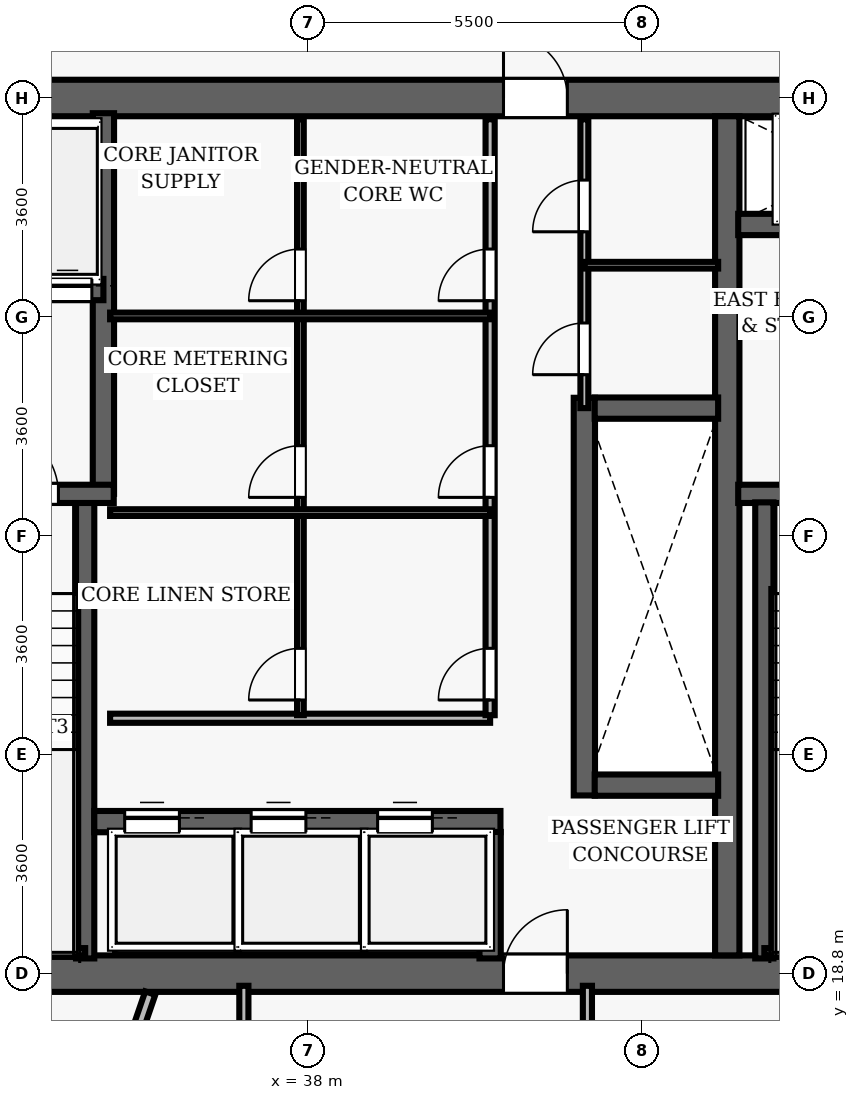
"""IFC4 building model, lengths in metres.
Left out: names, types, materials, properties, quantities, classifications, styles, units other than length and angle.
Written with IfcOpenShell. Run it as: python <this file> out.ifc"""

import sys

from ifc_helpers import new_model, si_unit, direction, frame, frame_2d, origin, place, context, subcontext, project, spatial, rectangle, extrude, element, fill, save


model = new_model("IFC4")
c1 = context("Model", 3, precision=1e-05, world=origin(), true_north=direction((0.0, 1.0)))
c2 = subcontext(c1, "Body", "Model", "MODEL_VIEW")
j1 = project(units=[si_unit("LENGTHUNIT", "METRE"), si_unit("PLANEANGLEUNIT", "RADIAN")], contexts=[c1])
p1 = place(None, origin())
s1 = spatial("IfcSite", under=j1, at=p1, CompositionType="ELEMENT")
p2 = place(p1, origin())
s2 = spatial("IfcBuilding", under=s1, at=p2, CompositionType="ELEMENT")
p3 = place(p2, frame((0.0, 0.0, 113.3)))
s3 = spatial("IfcBuildingStorey", under=s2, at=p3, CompositionType="ELEMENT", Elevation=113.3)
p4 = place(p3, frame((26.7, 18.8, 0.0), z_axis=(0.0, 0.0, 1.0), x_axis=(1.0, 0.0, 0.0)))
e1 = element("IfcWall", 1, at=p4, inside=s3, PredefinedType="SHEAR", context=c2, shape_type="SweptSolid", body=[
    extrude(rectangle(XDim=22.6, YDim=0.6, at=frame_2d((11.3, 0.0))), origin(), (0.0, 0.0, 1.0), 3.5),
])
p5 = place(p4, frame((14.52, 0.0, 0.0)))
e2 = element("IfcOpeningElement", 2, at=p5, cuts=e1, PredefinedType="OPENING", context=c2, shape_type="SweptSolid", body=[
    extrude(rectangle(XDim=1.05, YDim=2.15, at=frame_2d((0.525, 1.075))), frame((0.0, 0.31, 0.0), z_axis=(0.0, -1.0, 0.0), x_axis=(1.0, 0.0, 0.0)), (0.0, 0.0, 1.0), 0.62),
])
p6 = place(p3, frame((26.7, 33.2, 0.0), z_axis=(0.0, 0.0, 1.0), x_axis=(1.0, 0.0, 0.0)))
e3 = element("IfcWall", 3, at=p6, inside=s3, PredefinedType="SHEAR", context=c2, shape_type="SweptSolid", body=[
    extrude(rectangle(XDim=22.6, YDim=0.6, at=frame_2d((11.3, 0.0))), origin(), (0.0, 0.0, 1.0), 3.5),
])
p7 = place(p6, frame((4.62, 0.0, 0.0)))
e4 = element("IfcOpeningElement", 4, at=p7, cuts=e3, PredefinedType="OPENING", context=c2, shape_type="SweptSolid", body=[
    extrude(rectangle(XDim=1.05, YDim=2.15, at=frame_2d((0.525, 1.075))), frame((0.0, 0.31, 0.0), z_axis=(0.0, -1.0, 0.0), x_axis=(1.0, 0.0, 0.0)), (0.0, 0.0, 1.0), 0.62),
])
p8 = place(p6, frame((14.52, 0.0, 0.0)))
e5 = element("IfcOpeningElement", 5, at=p8, cuts=e3, PredefinedType="OPENING", context=c2, shape_type="SweptSolid", body=[
    extrude(rectangle(XDim=1.05, YDim=2.15, at=frame_2d((0.525, 1.075))), frame((0.0, 0.31, 0.0), z_axis=(0.0, -1.0, 0.0), x_axis=(1.0, 0.0, 0.0)), (0.0, 0.0, 1.0), 0.62),
])
p9 = place(p3, frame((44.9, 19.1, 0.0), z_axis=(0.0, 0.0, 1.0), x_axis=(0.0, 1.0, 0.0)))
e6 = element("IfcWall", 6, at=p9, inside=s3, PredefinedType="SHEAR", context=c2, shape_type="SweptSolid", body=[
    extrude(rectangle(XDim=13.8, YDim=0.4, at=frame_2d((6.9, 0.0))), origin(), (0.0, 0.0, 1.0), 3.5),
])
p10 = place(p3, frame((45.08, 26.69, 0.0), z_axis=(0.0, 0.0, 1.0), x_axis=(1.0, 0.0, 0.0)))
e7 = element("IfcWall", 7, at=p10, inside=s3, PredefinedType="SHEAR", context=c2, shape_type="SweptSolid", body=[
    extrude(rectangle(XDim=3.67, YDim=0.3, at=frame_2d((1.835, 0.0))), origin(), (0.0, 0.0, 1.0), 3.5),
])
p11 = place(p10, frame((1.05, 0.0, 0.0)))
e8 = element("IfcOpeningElement", 8, at=p11, cuts=e7, PredefinedType="OPENING", context=c2, shape_type="SweptSolid", body=[
    extrude(rectangle(XDim=1.1, YDim=2.15, at=frame_2d((0.55, 1.075))), frame((0.0, 0.16, 0.0), z_axis=(0.0, -1.0, 0.0), x_axis=(1.0, 0.0, 0.0)), (0.0, 0.0, 1.0), 0.32),
])
p12 = place(p3, frame((45.51, 19.05, 0.0), z_axis=(0.0, 0.0, 1.0), x_axis=(0.0, 1.0, 0.0)))
e9 = element("IfcWall", 9, at=p12, inside=s3, PredefinedType="SHEAR", context=c2, shape_type="SweptSolid", body=[
    extrude(rectangle(XDim=7.5, YDim=0.3, at=frame_2d((3.75, 0.0))), origin(), (0.0, 0.0, 1.0), 3.5),
])
p13 = place(p3, frame((45.51, 19.16, 0.0), z_axis=(0.0, 0.0, 1.0), x_axis=(1.0, 0.0, 0.0)))
e10 = element("IfcWall", 10, at=p13, inside=s3, PredefinedType="SHEAR", context=c2, shape_type="SweptSolid", body=[
    extrude(rectangle(XDim=3.095, YDim=0.12, at=frame_2d((1.547, 0.0))), origin(), (0.0, 0.0, 1.0), 3.5),
])
p14 = place(p3, frame((45.08, 31.12, 0.0), z_axis=(0.0, 0.0, 1.0), x_axis=(1.0, 0.0, 0.0)))
e11 = element("IfcWall", 11, at=p14, inside=s3, PredefinedType="SHEAR", context=c2, shape_type="SweptSolid", body=[
    extrude(rectangle(XDim=3.67, YDim=0.35, at=frame_2d((1.835, 0.0))), origin(), (0.0, 0.0, 1.0), 2.675),
])
p15 = place(p14, frame((1.25, 0.0, 0.0)))
e12 = element("IfcOpeningElement", 12, at=p15, cuts=e11, PredefinedType="OPENING", context=c2, shape_type="SweptSolid", body=[
    extrude(rectangle(XDim=1.1, YDim=2.15, at=frame_2d((0.55, 1.075))), frame((0.0, 0.185, 0.0), z_axis=(0.0, -1.0, 0.0), x_axis=(1.0, 0.0, 0.0)), (0.0, 0.0, 1.0), 0.37),
])
p16 = place(p3, frame((34.34, 19.05, 0.0), z_axis=(0.0, 0.0, 1.0), x_axis=(0.0, 1.0, 0.0)))
e13 = element("IfcWall", 13, at=p16, inside=s3, PredefinedType="SHEAR", context=c2, shape_type="SweptSolid", body=[
    extrude(rectangle(XDim=7.5, YDim=0.3, at=frame_2d((3.75, 0.0))), origin(), (0.0, 0.0, 1.0), 3.5),
])
p17 = place(p3, frame((34.64, 26.69, 0.0), z_axis=(0.0, 0.0, 1.0), x_axis=(0.0, 1.0, 0.0)))
e14 = element("IfcWall", 14, at=p17, inside=s3, PredefinedType="SHEAR", context=c2, shape_type="SweptSolid", body=[
    extrude(rectangle(XDim=6.26, YDim=0.35, at=frame_2d((3.13, 0.0))), origin(), (0.0, 0.0, 1.0), 3.5),
])
p18 = place(p3, frame((31.25, 26.69, 0.0), z_axis=(0.0, 0.0, 1.0), x_axis=(1.0, 0.0, 0.0)))
e15 = element("IfcWall", 15, at=p18, inside=s3, PredefinedType="SHEAR", context=c2, shape_type="SweptSolid", body=[
    extrude(rectangle(XDim=3.56, YDim=0.3, at=frame_2d((1.78, 0.0))), origin(), (0.0, 0.0, 1.0), 3.5),
])
p19 = place(p18, frame((1.55, 0.0, 0.0)))
e16 = element("IfcOpeningElement", 16, at=p19, cuts=e15, PredefinedType="OPENING", context=c2, shape_type="SweptSolid", body=[
    extrude(rectangle(XDim=1.1, YDim=2.15, at=frame_2d((0.55, 1.075))), frame((0.0, 0.16, 0.0), z_axis=(0.0, -1.0, 0.0), x_axis=(1.0, 0.0, 0.0)), (0.0, 0.0, 1.0), 0.32),
])
p20 = place(p3, frame((31.3, 19.16, 0.0), z_axis=(0.0, 0.0, 1.0), x_axis=(1.0, 0.0, 0.0)))
e17 = element("IfcWall", 17, at=p20, inside=s3, PredefinedType="SHEAR", context=c2, shape_type="SweptSolid", body=[
    extrude(rectangle(XDim=3.04, YDim=0.12, at=frame_2d((1.52, 0.0))), origin(), (0.0, 0.0, 1.0), 3.5),
])
p21 = place(p3, frame((32.23, 30.05, 0.0), z_axis=(0.0, 0.0, 1.0), x_axis=(1.0, 0.0, 0.0)))
e18 = element("IfcWall", 18, at=p21, inside=s3, PredefinedType="SHEAR", context=c2, shape_type="SweptSolid", body=[
    extrude(rectangle(XDim=2.41, YDim=0.35, at=frame_2d((1.205, 0.0))), origin(), (0.0, 0.0, 1.0), 2.675),
])
p22 = place(p21, frame((0.42, 0.0, 0.0)))
e19 = element("IfcOpeningElement", 19, at=p22, cuts=e18, PredefinedType="OPENING", context=c2, shape_type="SweptSolid", body=[
    extrude(rectangle(XDim=0.8, YDim=2.15, at=frame_2d((0.4, 1.075))), frame((0.0, 0.185, 0.0), z_axis=(0.0, -1.0, 0.0), x_axis=(1.0, 0.0, 0.0)), (0.0, 0.0, 1.0), 0.37),
])
p23 = place(p21, frame((1.42, 0.0, 0.0)))
e20 = element("IfcOpeningElement", 20, at=p23, cuts=e18, PredefinedType="OPENING", context=c2, shape_type="SweptSolid", body=[
    extrude(rectangle(XDim=0.8, YDim=2.15, at=frame_2d((0.4, 1.075))), frame((0.0, 0.185, 0.0), z_axis=(0.0, -1.0, 0.0), x_axis=(1.0, 0.0, 0.0)), (0.0, 0.0, 1.0), 0.37),
])
p24 = place(p3, frame((42.55, 21.73, 0.0), z_axis=(0.0, 0.0, 1.0), x_axis=(0.0, 1.0, 0.0)))
e21 = element("IfcWall", 21, at=p24, inside=s3, PredefinedType="SHEAR", context=c2, shape_type="SweptSolid", body=[
    extrude(rectangle(XDim=6.54, YDim=0.35, at=frame_2d((3.27, 0.0))), origin(), (0.0, 0.0, 1.0), 2.675),
])
for number, where, z_axis, x_axis in (
    (22, (42.72, 21.9, 0.0), (0.0, 0.0, 1.0), (1.0, 0.0, 0.0)),
    (23, (42.72, 28.1, 0.0), (0.0, 0.0, 1.0), (1.0, 0.0, 0.0)),
):
    element("IfcWall", number, at=place(p3, frame(where, z_axis=z_axis, x_axis=x_axis)), inside=s3, PredefinedType="SHEAR", context=c2, shape_type="SweptSolid", body=[
        extrude(rectangle(XDim=2.03, YDim=0.35, at=frame_2d((1.015, 0.0))), origin(), (0.0, 0.0, 1.0), 2.675),
    ])
p25 = place(p3, frame((34.49, 21.3, 0.0), z_axis=(0.0, 0.0, 1.0), x_axis=(1.0, 0.0, 0.0)))
e24 = element("IfcWall", 24, at=p25, inside=s3, PredefinedType="SHEAR", context=c2, shape_type="SweptSolid", body=[
    extrude(rectangle(XDim=6.68, YDim=0.35, at=frame_2d((3.34, 0.0))), origin(), (0.0, 0.0, 1.0), 2.675),
])
p26 = place(p25, frame((0.5, 0.0, 0.0)))
e25 = element("IfcOpeningElement", 25, at=p26, cuts=e24, PredefinedType="OPENING", context=c2, shape_type="SweptSolid", body=[
    extrude(rectangle(XDim=0.9, YDim=2.15, at=frame_2d((0.45, 1.075))), frame((0.0, 0.185, 0.0), z_axis=(0.0, -1.0, 0.0), x_axis=(1.0, 0.0, 0.0)), (0.0, 0.0, 1.0), 0.37),
])
p27 = place(p25, frame((2.58, 0.0, 0.0)))
e26 = element("IfcOpeningElement", 26, at=p27, cuts=e24, PredefinedType="OPENING", context=c2, shape_type="SweptSolid", body=[
    extrude(rectangle(XDim=0.9, YDim=2.15, at=frame_2d((0.45, 1.075))), frame((0.0, 0.185, 0.0), z_axis=(0.0, -1.0, 0.0), x_axis=(1.0, 0.0, 0.0)), (0.0, 0.0, 1.0), 0.37),
])
p28 = place(p25, frame((4.66, 0.0, 0.0)))
e27 = element("IfcOpeningElement", 27, at=p28, cuts=e24, PredefinedType="OPENING", context=c2, shape_type="SweptSolid", body=[
    extrude(rectangle(XDim=0.9, YDim=2.15, at=frame_2d((0.45, 1.075))), frame((0.0, 0.185, 0.0), z_axis=(0.0, -1.0, 0.0), x_axis=(1.0, 0.0, 0.0)), (0.0, 0.0, 1.0), 0.37),
])
p29 = place(p3, frame((41.0, 19.05, 0.0), z_axis=(0.0, 0.0, 1.0), x_axis=(0.0, 1.0, 0.0)))
e28 = element("IfcWall", 28, at=p29, inside=s3, PredefinedType="SHEAR", context=c2, shape_type="SweptSolid", body=[
    extrude(rectangle(XDim=2.08, YDim=0.35, at=frame_2d((1.04, 0.0))), origin(), (0.0, 0.0, 1.0), 2.675),
])
p30 = place(p3, frame((34.75, 23.0, 0.0), z_axis=(0.0, 0.0, 1.0), x_axis=(1.0, 0.0, 0.0)))
e29 = element("IfcWall", 29, at=p30, inside=s3, PredefinedType="PARTITIONING", context=c2, shape_type="SweptSolid", body=[
    extrude(rectangle(XDim=6.25, YDim=0.15, at=frame_2d((3.125, 0.0))), origin(), (0.0, 0.0, 1.0), 2.675),
])
p31 = place(p3, frame((41.0, 23.05, 0.0), z_axis=(0.0, 0.0, 1.0), x_axis=(0.0, 1.0, 0.0)))
e30 = element("IfcWall", 30, at=p31, inside=s3, PredefinedType="PARTITIONING", context=c2, shape_type="SweptSolid", body=[
    extrude(rectangle(XDim=9.8, YDim=0.15, at=frame_2d((4.9, 0.0))), origin(), (0.0, 0.0, 1.0), 2.675),
])
p32 = place(p31, frame((0.25, 0.0, 0.0)))
e31 = element("IfcOpeningElement", 31, at=p32, cuts=e30, PredefinedType="OPENING", context=c2, shape_type="SweptSolid", body=[
    extrude(rectangle(XDim=0.85, YDim=2.1, at=frame_2d((0.425, 1.05))), frame((0.0, 0.085, 0.0), z_axis=(0.0, -1.0, 0.0), x_axis=(1.0, 0.0, 0.0)), (0.0, 0.0, 1.0), 0.17),
])
p33 = place(p31, frame((3.582, 0.0, 0.0)))
e32 = element("IfcOpeningElement", 32, at=p33, cuts=e30, PredefinedType="OPENING", context=c2, shape_type="SweptSolid", body=[
    extrude(rectangle(XDim=0.85, YDim=2.1, at=frame_2d((0.425, 1.05))), frame((0.0, 0.085, 0.0), z_axis=(0.0, -1.0, 0.0), x_axis=(1.0, 0.0, 0.0)), (0.0, 0.0, 1.0), 0.17),
])
p34 = place(p31, frame((6.816, 0.0, 0.0)))
e33 = element("IfcOpeningElement", 33, at=p34, cuts=e30, PredefinedType="OPENING", context=c2, shape_type="SweptSolid", body=[
    extrude(rectangle(XDim=0.85, YDim=2.1, at=frame_2d((0.425, 1.05))), frame((0.0, 0.085, 0.0), z_axis=(0.0, -1.0, 0.0), x_axis=(1.0, 0.0, 0.0)), (0.0, 0.0, 1.0), 0.17),
])
p35 = place(p3, frame((37.88, 23.05, 0.0), z_axis=(0.0, 0.0, 1.0), x_axis=(0.0, 1.0, 0.0)))
e34 = element("IfcWall", 34, at=p35, inside=s3, PredefinedType="PARTITIONING", context=c2, shape_type="SweptSolid", body=[
    extrude(rectangle(XDim=9.8, YDim=0.11, at=frame_2d((4.9, 0.0))), origin(), (0.0, 0.0, 1.0), 2.675),
])
p36 = place(p35, frame((0.25, 0.0, 0.0)))
e35 = element("IfcOpeningElement", 35, at=p36, cuts=e34, PredefinedType="OPENING", context=c2, shape_type="SweptSolid", body=[
    extrude(rectangle(XDim=0.85, YDim=2.1, at=frame_2d((0.425, 1.05))), frame((0.0, 0.065, 0.0), z_axis=(0.0, -1.0, 0.0), x_axis=(1.0, 0.0, 0.0)), (0.0, 0.0, 1.0), 0.13),
])
p37 = place(p35, frame((3.582, 0.0, 0.0)))
e36 = element("IfcOpeningElement", 36, at=p37, cuts=e34, PredefinedType="OPENING", context=c2, shape_type="SweptSolid", body=[
    extrude(rectangle(XDim=0.85, YDim=2.1, at=frame_2d((0.425, 1.05))), frame((0.0, 0.065, 0.0), z_axis=(0.0, -1.0, 0.0), x_axis=(1.0, 0.0, 0.0)), (0.0, 0.0, 1.0), 0.13),
])
p38 = place(p35, frame((6.816, 0.0, 0.0)))
e37 = element("IfcOpeningElement", 37, at=p38, cuts=e34, PredefinedType="OPENING", context=c2, shape_type="SweptSolid", body=[
    extrude(rectangle(XDim=0.85, YDim=2.1, at=frame_2d((0.425, 1.05))), frame((0.0, 0.065, 0.0), z_axis=(0.0, -1.0, 0.0), x_axis=(1.0, 0.0, 0.0)), (0.0, 0.0, 1.0), 0.13),
])
for number, where, z_axis, x_axis in (
    (38, (34.75, 26.382, 0.0), (0.0, 0.0, 1.0), (1.0, 0.0, 0.0)),
    (39, (34.75, 29.616, 0.0), (0.0, 0.0, 1.0), (1.0, 0.0, 0.0)),
):
    element("IfcWall", number, at=place(p3, frame(where, z_axis=z_axis, x_axis=x_axis)), inside=s3, PredefinedType="PARTITIONING", context=c2, shape_type="SweptSolid", body=[
        extrude(rectangle(XDim=6.25, YDim=0.11, at=frame_2d((3.125, 0.0))), origin(), (0.0, 0.0, 1.0), 2.675),
    ])
p39 = place(p3, frame((42.55, 28.1, 0.0), z_axis=(0.0, 0.0, 1.0), x_axis=(0.0, 1.0, 0.0)))
e40 = element("IfcWall", 40, at=p39, inside=s3, PredefinedType="PARTITIONING", context=c2, shape_type="SweptSolid", body=[
    extrude(rectangle(XDim=4.75, YDim=0.13, at=frame_2d((2.375, 0.0))), origin(), (0.0, 0.0, 1.0), 2.675),
])
p40 = place(p39, frame((0.55, 0.0, 0.0)))
e41 = element("IfcOpeningElement", 41, at=p40, cuts=e40, PredefinedType="OPENING", context=c2, shape_type="SweptSolid", body=[
    extrude(rectangle(XDim=0.85, YDim=2.1, at=frame_2d((0.425, 1.05))), frame((0.0, 0.075, 0.0), z_axis=(0.0, -1.0, 0.0), x_axis=(1.0, 0.0, 0.0)), (0.0, 0.0, 1.0), 0.15),
])
p41 = place(p39, frame((2.9, 0.0, 0.0)))
e42 = element("IfcOpeningElement", 42, at=p41, cuts=e40, PredefinedType="OPENING", context=c2, shape_type="SweptSolid", body=[
    extrude(rectangle(XDim=0.85, YDim=2.1, at=frame_2d((0.425, 1.05))), frame((0.0, 0.075, 0.0), z_axis=(0.0, -1.0, 0.0), x_axis=(1.0, 0.0, 0.0)), (0.0, 0.0, 1.0), 0.15),
])
p42 = place(p3, frame((42.55, 30.45, 0.0), z_axis=(0.0, 0.0, 1.0), x_axis=(1.0, 0.0, 0.0)))
e43 = element("IfcWall", 43, at=p42, inside=s3, PredefinedType="PARTITIONING", context=c2, shape_type="SweptSolid", body=[
    extrude(rectangle(XDim=2.2, YDim=0.11, at=frame_2d((1.1, 0.0))), origin(), (0.0, 0.0, 1.0), 2.675),
])
p43 = place(p3, frame((36.95, 11.2, 0.0), z_axis=(0.0, 0.0, 1.0), x_axis=(0.0, 1.0, 0.0)))
e44 = element("IfcWall", 44, at=p43, inside=s3, PredefinedType="PARTITIONING", context=c2, shape_type="SweptSolid", body=[
    extrude(rectangle(XDim=7.4, YDim=0.15, at=frame_2d((3.7, 0.0))), origin(), (0.0, 0.0, 1.0), 2.675),
])
p44 = place(p43, frame((5.075, 0.0, 0.0)))
e45 = element("IfcOpeningElement", 45, at=p44, cuts=e44, PredefinedType="OPENING", context=c2, shape_type="SweptSolid", body=[
    extrude(rectangle(XDim=0.95, YDim=2.15, at=frame_2d((0.475, 1.075))), frame((0.0, 0.085, 0.0), z_axis=(0.0, -1.0, 0.0), x_axis=(1.0, 0.0, 0.0)), (0.0, 0.0, 1.0), 0.17),
])
p45 = place(p3, frame((42.6, 16.65, 0.0), z_axis=(0.0, 0.0, 1.0), x_axis=(0.0, 1.0, 0.0)))
e46 = element("IfcWall", 46, at=p45, inside=s3, PredefinedType="PARTITIONING", context=c2, shape_type="SweptSolid", body=[
    extrude(rectangle(XDim=1.95, YDim=0.15, at=frame_2d((0.975, 0.0))), origin(), (0.0, 0.0, 1.0), 2.675),
])
p46 = place(p3, frame((35.411, 18.48, 0.0), z_axis=(0.0, 0.0, 1.0), x_axis=(-0.325564767914, -0.945519741673, 0.0)))
e47 = element("IfcWall", 47, at=p46, inside=s3, PredefinedType="PARTITIONING", context=c2, shape_type="SweptSolid", body=[
    extrude(rectangle(XDim=14.981, YDim=0.175, at=frame_2d((7.491, 0.0))), origin(), (0.0, 0.0, 1.0), 2.675),
])
p47 = place(p19, origin())
e48 = element("IfcDoor", 48, at=p47, inside=s3, OperationType="SINGLE_SWING_LEFT", PredefinedType="DOOR", context=c2, shape_type="SweptSolid", body=[
    extrude(rectangle(XDim=1.1, YDim=2.15, at=frame_2d((0.55, 1.075))), frame((0.0, 0.025, 0.0), z_axis=(0.0, -1.0, 0.0), x_axis=(1.0, 0.0, 0.0)), (0.0, 0.0, 1.0), 0.05),
])
fill(e16, e48)
p48 = place(p8, origin())
e49 = element("IfcDoor", 49, at=p48, inside=s3, OperationType="SINGLE_SWING_LEFT", PredefinedType="DOOR", context=c2, shape_type="SweptSolid", body=[
    extrude(rectangle(XDim=1.05, YDim=2.15, at=frame_2d((0.525, 1.075))), frame((0.0, 0.025, 0.0), z_axis=(0.0, -1.0, 0.0), x_axis=(1.0, 0.0, 0.0)), (0.0, 0.0, 1.0), 0.05),
])
fill(e5, e49)
p49 = place(p5, origin())
e50 = element("IfcDoor", 50, at=p49, inside=s3, OperationType="SINGLE_SWING_RIGHT", PredefinedType="DOOR", context=c2, shape_type="SweptSolid", body=[
    extrude(rectangle(XDim=1.05, YDim=2.15, at=frame_2d((0.525, 1.075))), frame((0.0, 0.025, 0.0), z_axis=(0.0, -1.0, 0.0), x_axis=(1.0, 0.0, 0.0)), (0.0, 0.0, 1.0), 0.05),
])
fill(e2, e50)
p50 = place(p32, origin())
e51 = element("IfcDoor", 51, at=p50, inside=s3, OperationType="SINGLE_SWING_LEFT", PredefinedType="DOOR", context=c2, shape_type="SweptSolid", body=[
    extrude(rectangle(XDim=0.85, YDim=2.1, at=frame_2d((0.425, 1.05))), frame((0.0, 0.025, 0.0), z_axis=(0.0, -1.0, 0.0), x_axis=(1.0, 0.0, 0.0)), (0.0, 0.0, 1.0), 0.05),
])
fill(e31, e51)
p51 = place(p36, origin())
e52 = element("IfcDoor", 52, at=p51, inside=s3, OperationType="SINGLE_SWING_LEFT", PredefinedType="DOOR", context=c2, shape_type="SweptSolid", body=[
    extrude(rectangle(XDim=0.85, YDim=2.1, at=frame_2d((0.425, 1.05))), frame((0.0, 0.025, 0.0), z_axis=(0.0, -1.0, 0.0), x_axis=(1.0, 0.0, 0.0)), (0.0, 0.0, 1.0), 0.05),
])
fill(e35, e52)
p52 = place(p33, origin())
e53 = element("IfcDoor", 53, at=p52, inside=s3, OperationType="SINGLE_SWING_LEFT", PredefinedType="DOOR", context=c2, shape_type="SweptSolid", body=[
    extrude(rectangle(XDim=0.85, YDim=2.1, at=frame_2d((0.425, 1.05))), frame((0.0, 0.025, 0.0), z_axis=(0.0, -1.0, 0.0), x_axis=(1.0, 0.0, 0.0)), (0.0, 0.0, 1.0), 0.05),
])
fill(e32, e53)
p53 = place(p37, origin())
e54 = element("IfcDoor", 54, at=p53, inside=s3, OperationType="SINGLE_SWING_LEFT", PredefinedType="DOOR", context=c2, shape_type="SweptSolid", body=[
    extrude(rectangle(XDim=0.85, YDim=2.1, at=frame_2d((0.425, 1.05))), frame((0.0, 0.025, 0.0), z_axis=(0.0, -1.0, 0.0), x_axis=(1.0, 0.0, 0.0)), (0.0, 0.0, 1.0), 0.05),
])
fill(e36, e54)
p54 = place(p34, origin())
e55 = element("IfcDoor", 55, at=p54, inside=s3, OperationType="SINGLE_SWING_LEFT", PredefinedType="DOOR", context=c2, shape_type="SweptSolid", body=[
    extrude(rectangle(XDim=0.85, YDim=2.1, at=frame_2d((0.425, 1.05))), frame((0.0, 0.025, 0.0), z_axis=(0.0, -1.0, 0.0), x_axis=(1.0, 0.0, 0.0)), (0.0, 0.0, 1.0), 0.05),
])
fill(e33, e55)
p55 = place(p38, origin())
e56 = element("IfcDoor", 56, at=p55, inside=s3, OperationType="SINGLE_SWING_LEFT", PredefinedType="DOOR", context=c2, shape_type="SweptSolid", body=[
    extrude(rectangle(XDim=0.85, YDim=2.1, at=frame_2d((0.425, 1.05))), frame((0.0, 0.025, 0.0), z_axis=(0.0, -1.0, 0.0), x_axis=(1.0, 0.0, 0.0)), (0.0, 0.0, 1.0), 0.05),
])
fill(e37, e56)
p56 = place(p40, origin())
e57 = element("IfcDoor", 57, at=p56, inside=s3, OperationType="SINGLE_SWING_LEFT", PredefinedType="DOOR", context=c2, shape_type="SweptSolid", body=[
    extrude(rectangle(XDim=0.85, YDim=2.1, at=frame_2d((0.425, 1.05))), frame((0.0, 0.025, 0.0), z_axis=(0.0, -1.0, 0.0), x_axis=(1.0, 0.0, 0.0)), (0.0, 0.0, 1.0), 0.05),
])
fill(e41, e57)
p57 = place(p41, origin())
e58 = element("IfcDoor", 58, at=p57, inside=s3, OperationType="SINGLE_SWING_LEFT", PredefinedType="DOOR", context=c2, shape_type="SweptSolid", body=[
    extrude(rectangle(XDim=0.85, YDim=2.1, at=frame_2d((0.425, 1.05))), frame((0.0, 0.025, 0.0), z_axis=(0.0, -1.0, 0.0), x_axis=(1.0, 0.0, 0.0)), (0.0, 0.0, 1.0), 0.05),
])
fill(e42, e58)
p58 = place(p26, origin())
e59 = element("IfcDoor", 59, at=p58, inside=s3, OperationType="SLIDING_TO_LEFT", PredefinedType="DOOR", context=c2, shape_type="SweptSolid", body=[
    extrude(rectangle(XDim=0.9, YDim=2.15, at=frame_2d((0.45, 1.075))), frame((0.0, 0.025, 0.0), z_axis=(0.0, -1.0, 0.0), x_axis=(1.0, 0.0, 0.0)), (0.0, 0.0, 1.0), 0.05),
])
fill(e25, e59)
p59 = place(p27, origin())
e60 = element("IfcDoor", 60, at=p59, inside=s3, OperationType="SLIDING_TO_LEFT", PredefinedType="DOOR", context=c2, shape_type="SweptSolid", body=[
    extrude(rectangle(XDim=0.9, YDim=2.15, at=frame_2d((0.45, 1.075))), frame((0.0, 0.025, 0.0), z_axis=(0.0, -1.0, 0.0), x_axis=(1.0, 0.0, 0.0)), (0.0, 0.0, 1.0), 0.05),
])
fill(e26, e60)
p60 = place(p28, origin())
e61 = element("IfcDoor", 61, at=p60, inside=s3, OperationType="SLIDING_TO_LEFT", PredefinedType="DOOR", context=c2, shape_type="SweptSolid", body=[
    extrude(rectangle(XDim=0.9, YDim=2.15, at=frame_2d((0.45, 1.075))), frame((0.0, 0.025, 0.0), z_axis=(0.0, -1.0, 0.0), x_axis=(1.0, 0.0, 0.0)), (0.0, 0.0, 1.0), 0.05),
])
fill(e27, e61)
p61 = place(p23, origin())
e62 = element("IfcDoor", 62, at=p61, inside=s3, OperationType="SLIDING_TO_LEFT", PredefinedType="DOOR", context=c2, shape_type="SweptSolid", body=[
    extrude(rectangle(XDim=0.8, YDim=2.15, at=frame_2d((0.4, 1.075))), frame((0.0, 0.025, 0.0), z_axis=(0.0, -1.0, 0.0), x_axis=(1.0, 0.0, 0.0)), (0.0, 0.0, 1.0), 0.05),
])
fill(e20, e62)
save(model, sys.argv[1])
